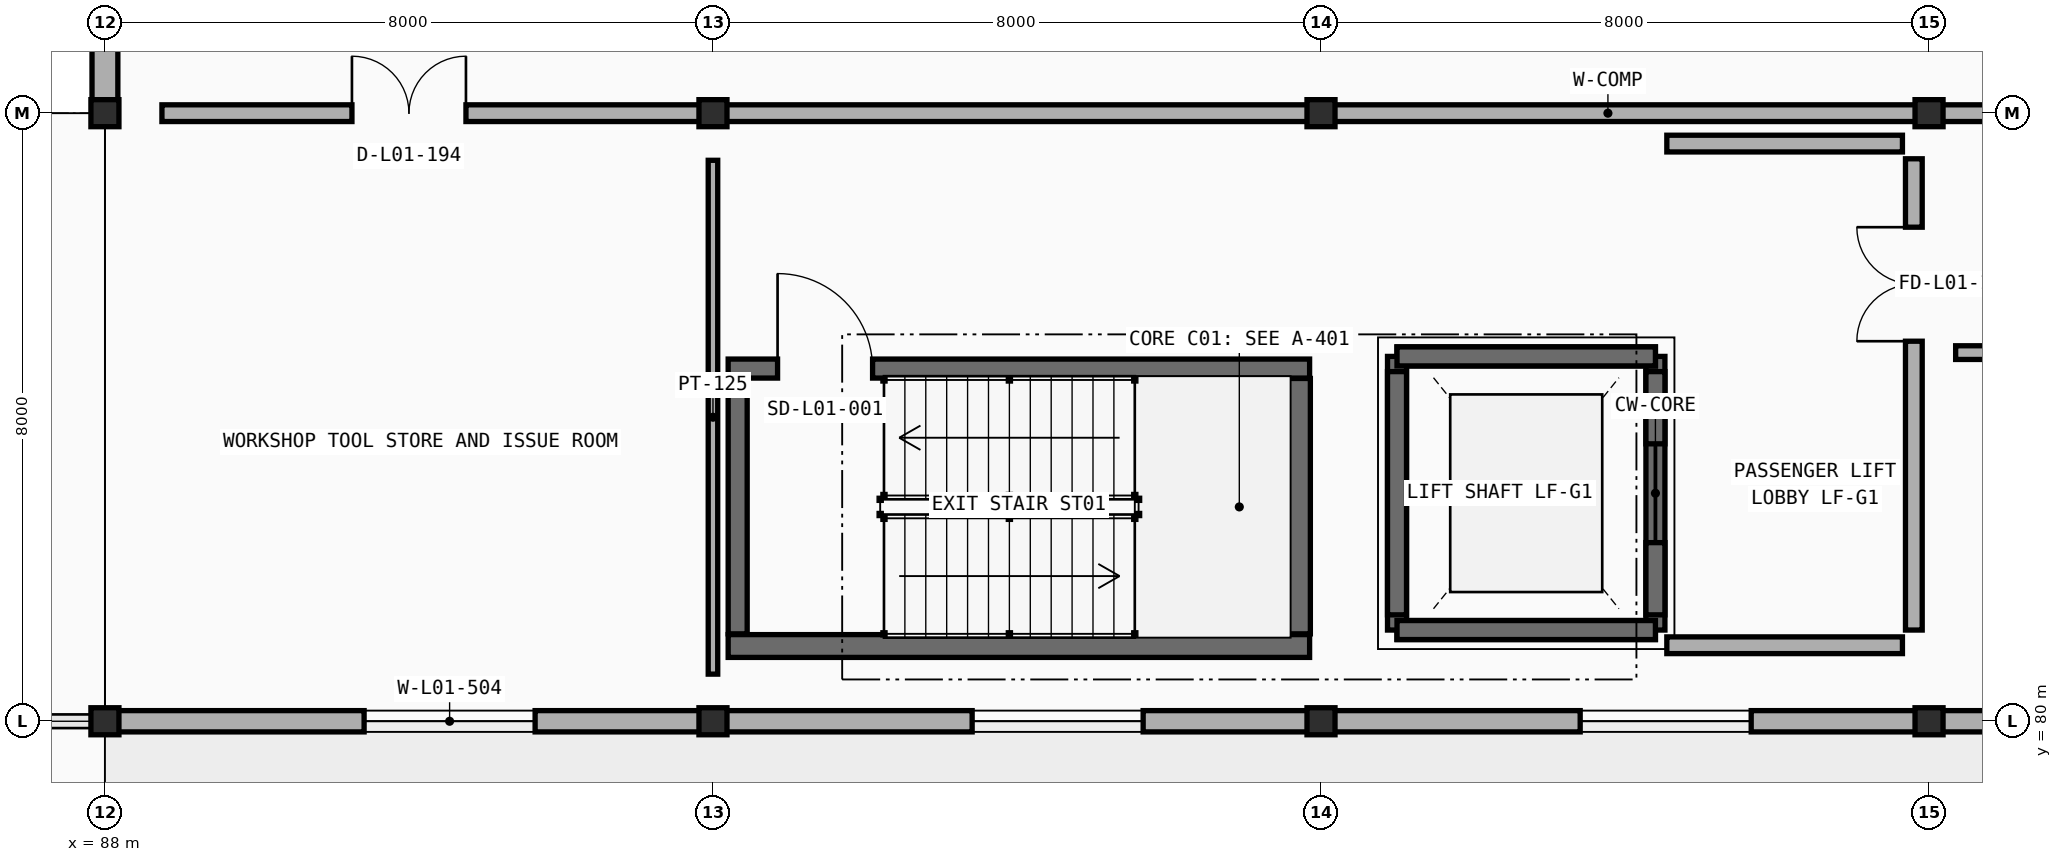
"""IFC4 building model, lengths in metres.
Left out: names, types, materials, properties, quantities, classifications, styles, units other than length and angle.
Written with IfcOpenShell. Run it as: python <this file> out.ifc"""

import sys

from ifc_helpers import new_model, si_unit, direction, frame, frame_2d, origin, origin_2d, place, context, subcontext, project, spatial, rectangle, i_section, extrude, element, fill, save


model = new_model("IFC4")
c1 = context("Model", 3, precision=1e-05, world=origin(), true_north=direction((0.0, 1.0)))
c2 = subcontext(c1, "Body", "Model", "MODEL_VIEW")
j1 = project(units=[si_unit("LENGTHUNIT", "METRE"), si_unit("PLANEANGLEUNIT", "RADIAN")], contexts=[c1])
p1 = place(None, origin())
s1 = spatial("IfcSite", under=j1, at=p1, CompositionType="ELEMENT")
p2 = place(p1, origin())
s2 = spatial("IfcBuilding", under=s1, at=p2, CompositionType="ELEMENT")
p3 = place(p2, origin())
s3 = spatial("IfcBuildingStorey", under=s2, at=p3, CompositionType="ELEMENT", Elevation=0.0)
for number, where, z_axis, x_axis in (
    (1, (88.0, 80.0, 0.0), (0.0, 0.0, 1.0), (1.0, 0.0, 0.0)),
    (2, (96.0, 80.0, 0.0), (0.0, 0.0, 1.0), (1.0, 0.0, 0.0)),
    (3, (104.0, 80.0, 0.0), (0.0, 0.0, 1.0), (1.0, 0.0, 0.0)),
    (4, (112.0, 80.0, 0.0), (0.0, 0.0, 1.0), (1.0, 0.0, 0.0)),
    (5, (88.0, 88.0, 0.0), (0.0, 0.0, 1.0), (1.0, 0.0, 0.0)),
    (6, (96.0, 88.0, 0.0), (0.0, 0.0, 1.0), (1.0, 0.0, 0.0)),
    (7, (104.0, 88.0, 0.0), (0.0, 0.0, 1.0), (1.0, 0.0, 0.0)),
    (8, (112.0, 88.0, 0.0), (0.0, 0.0, 1.0), (1.0, 0.0, 0.0)),
):
    element("IfcColumn", number, at=place(p3, frame(where, z_axis=z_axis, x_axis=x_axis)), inside=s3, PredefinedType="COLUMN", context=c2, shape_type="SweptSolid", body=[
        extrude(i_section(OverallWidth=0.369, OverallDepth=0.356, WebThickness=0.01, FlangeThickness=0.018, FilletRadius=0.015, at=origin_2d()), origin(), (0.0, 0.0, 1.0), 4.8),
    ])
p4 = place(p3, frame((88.0, 88.004, 0.0), z_axis=(0.0, 0.0, 1.0), x_axis=(0.0, 1.0, 0.0)))
e9 = element("IfcWall", 9, at=p4, inside=s3, PredefinedType="STANDARD", context=c2, shape_type="SweptSolid", body=[
    extrude(rectangle(XDim=7.992, YDim=0.34, at=frame_2d((3.996, 0.0))), origin(), (0.0, 0.0, 1.0), 4.037),
])
p5 = place(p4, frame((2.276, 0.0, 1.2)))
e10 = element("IfcOpeningElement", 10, at=p5, cuts=e9, PredefinedType="OPENING", context=c2, shape_type="SweptSolid", body=[
    extrude(rectangle(XDim=2.05, YDim=2.0, at=frame_2d((1.025, 1.0))), frame((0.0, 0.18, 0.0), z_axis=(0.0, -1.0, 0.0), x_axis=(1.0, 0.0, 0.0)), (0.0, 0.0, 1.0), 0.36),
])
p6 = place(p3, frame((95.996, 80.0, 0.0), z_axis=(0.0, 0.0, 1.0), x_axis=(-1.0, 0.0, 0.0)))
e11 = element("IfcWall", 11, at=p6, inside=s3, PredefinedType="STANDARD", context=c2, shape_type="SweptSolid", body=[
    extrude(rectangle(XDim=7.992, YDim=0.28, at=frame_2d((3.996, 0.0))), origin(), (0.0, 0.0, 1.0), 3.895),
])
p7 = place(p6, frame((2.336, 0.0, 0.95)))
e12 = element("IfcOpeningElement", 12, at=p7, cuts=e11, PredefinedType="OPENING", context=c2, shape_type="SweptSolid", body=[
    extrude(rectangle(XDim=2.25, YDim=2.0, at=frame_2d((1.125, 1.0))), frame((0.0, 0.15, 0.0), z_axis=(0.0, -1.0, 0.0), x_axis=(1.0, 0.0, 0.0)), (0.0, 0.0, 1.0), 0.3),
])
p8 = place(p3, frame((103.996, 80.0, 0.0), z_axis=(0.0, 0.0, 1.0), x_axis=(-1.0, 0.0, 0.0)))
e13 = element("IfcWall", 13, at=p8, inside=s3, PredefinedType="STANDARD", context=c2, shape_type="SweptSolid", body=[
    extrude(rectangle(XDim=7.992, YDim=0.28, at=frame_2d((3.996, 0.0))), origin(), (0.0, 0.0, 1.0), 3.895),
])
p9 = place(p8, frame((2.336, 0.0, 0.95)))
e14 = element("IfcOpeningElement", 14, at=p9, cuts=e13, PredefinedType="OPENING", context=c2, shape_type="SweptSolid", body=[
    extrude(rectangle(XDim=2.25, YDim=2.0, at=frame_2d((1.125, 1.0))), frame((0.0, 0.15, 0.0), z_axis=(0.0, -1.0, 0.0), x_axis=(1.0, 0.0, 0.0)), (0.0, 0.0, 1.0), 0.3),
])
p10 = place(p3, frame((111.996, 80.0, 0.0), z_axis=(0.0, 0.0, 1.0), x_axis=(-1.0, 0.0, 0.0)))
e15 = element("IfcWall", 15, at=p10, inside=s3, PredefinedType="STANDARD", context=c2, shape_type="SweptSolid", body=[
    extrude(rectangle(XDim=7.992, YDim=0.28, at=frame_2d((3.996, 0.0))), origin(), (0.0, 0.0, 1.0), 3.895),
])
p11 = place(p10, frame((2.336, 0.0, 0.95)))
e16 = element("IfcOpeningElement", 16, at=p11, cuts=e15, PredefinedType="OPENING", context=c2, shape_type="SweptSolid", body=[
    extrude(rectangle(XDim=2.25, YDim=2.0, at=frame_2d((1.125, 1.0))), frame((0.0, 0.15, 0.0), z_axis=(0.0, -1.0, 0.0), x_axis=(1.0, 0.0, 0.0)), (0.0, 0.0, 1.0), 0.3),
])
p12 = place(p3, frame((119.996, 80.0, 0.0), z_axis=(0.0, 0.0, 1.0), x_axis=(-1.0, 0.0, 0.0)))
e17 = element("IfcWall", 17, at=p12, inside=s3, PredefinedType="STANDARD", context=c2, shape_type="SweptSolid", body=[
    extrude(rectangle(XDim=7.992, YDim=0.28, at=frame_2d((3.996, 0.0))), origin(), (0.0, 0.0, 1.0), 3.895),
])
p13 = place(p12, frame((2.736, 0.0, 0.0)))
e18 = element("IfcOpeningElement", 18, at=p13, cuts=e17, PredefinedType="OPENING", context=c2, shape_type="SweptSolid", body=[
    extrude(rectangle(XDim=2.0, YDim=2.4, at=frame_2d((1.0, 1.2))), frame((0.0, 0.15, 0.0), z_axis=(0.0, -1.0, 0.0), x_axis=(1.0, 0.0, 0.0)), (0.0, 0.0, 1.0), 0.3),
])
p14 = place(p3, frame((96.2, 80.99, 0.0), z_axis=(0.0, 0.0, 1.0), x_axis=(1.0, 0.0, 0.0)))
e19 = element("IfcWall", 19, at=p14, inside=s3, PredefinedType="SHEAR", context=c2, shape_type="SweptSolid", body=[
    extrude(rectangle(XDim=7.65, YDim=0.3, at=frame_2d((3.825, 0.0))), origin(), (0.0, 0.0, 1.0), 4.8),
])
p15 = place(p3, frame((103.71, 81.15, 0.0), z_axis=(0.0, 0.0, 1.0), x_axis=(0.0, 1.0, 0.0)))
e20 = element("IfcWall", 20, at=p15, inside=s3, PredefinedType="SHEAR", context=c2, shape_type="SweptSolid", body=[
    extrude(rectangle(XDim=3.36, YDim=0.3, at=frame_2d((1.68, 0.0))), origin(), (0.0, 0.0, 1.0), 4.8),
])
p16 = place(p3, frame((96.2, 84.64, 0.0), z_axis=(0.0, 0.0, 1.0), x_axis=(1.0, 0.0, 0.0)))
e21 = element("IfcWall", 21, at=p16, inside=s3, PredefinedType="SOLIDWALL", context=c2, shape_type="SweptSolid", body=[
    extrude(rectangle(XDim=7.65, YDim=0.25, at=frame_2d((3.825, 0.0))), origin(), (0.0, 0.0, 1.0), 4.8),
])
p17 = place(p16, frame((0.65, 0.0, 0.0)))
e22 = element("IfcOpeningElement", 22, at=p17, cuts=e21, PredefinedType="OPENING", context=c2, shape_type="SweptSolid", body=[
    extrude(rectangle(XDim=1.25, YDim=2.15, at=frame_2d((0.625, 1.075))), frame((0.0, 0.135, 0.0), z_axis=(0.0, -1.0, 0.0), x_axis=(1.0, 0.0, 0.0)), (0.0, 0.0, 1.0), 0.27),
])
p18 = place(p3, frame((96.325, 81.15, 0.0), z_axis=(0.0, 0.0, 1.0), x_axis=(0.0, 1.0, 0.0)))
e23 = element("IfcWall", 23, at=p18, inside=s3, PredefinedType="SOLIDWALL", context=c2, shape_type="SweptSolid", body=[
    extrude(rectangle(XDim=3.36, YDim=0.25, at=frame_2d((1.68, 0.0))), origin(), (0.0, 0.0, 1.0), 4.8),
])
p19 = place(p3, frame((105.0, 81.2, -1.5), z_axis=(0.0, 0.0, 1.0), x_axis=(1.0, 0.0, 0.0)))
e24 = element("IfcWall", 24, at=p19, inside=s3, PredefinedType="SOLIDWALL", context=c2, shape_type="SweptSolid", body=[
    extrude(rectangle(XDim=3.4, YDim=0.25, at=frame_2d((1.7, 0.0))), origin(), (0.0, 0.0, 1.0), 1.5),
])
p20 = place(p3, frame((108.4, 81.2, -1.5), z_axis=(0.0, 0.0, 1.0), x_axis=(0.0, 1.0, 0.0)))
e25 = element("IfcWall", 25, at=p20, inside=s3, PredefinedType="SOLIDWALL", context=c2, shape_type="SweptSolid", body=[
    extrude(rectangle(XDim=3.6, YDim=0.25, at=frame_2d((1.8, 0.0))), origin(), (0.0, 0.0, 1.0), 1.5),
])
p21 = place(p3, frame((108.4, 84.8, -1.5), z_axis=(0.0, 0.0, 1.0), x_axis=(-1.0, 0.0, 0.0)))
e26 = element("IfcWall", 26, at=p21, inside=s3, PredefinedType="SOLIDWALL", context=c2, shape_type="SweptSolid", body=[
    extrude(rectangle(XDim=3.4, YDim=0.25, at=frame_2d((1.7, 0.0))), origin(), (0.0, 0.0, 1.0), 1.5),
])
p22 = place(p3, frame((105.0, 84.8, -1.5), z_axis=(0.0, 0.0, 1.0), x_axis=(0.0, -1.0, 0.0)))
e27 = element("IfcWall", 27, at=p22, inside=s3, PredefinedType="SOLIDWALL", context=c2, shape_type="SweptSolid", body=[
    extrude(rectangle(XDim=3.6, YDim=0.25, at=frame_2d((1.8, 0.0))), origin(), (0.0, 0.0, 1.0), 1.5),
])
for number, where, z_axis, x_axis in (
    (28, (105.0, 81.2, 0.0), (0.0, 0.0, 1.0), (1.0, 0.0, 0.0)),
    (29, (105.0, 84.8, 0.0), (0.0, 0.0, 1.0), (1.0, 0.0, 0.0)),
):
    element("IfcWall", number, at=place(p3, frame(where, z_axis=z_axis, x_axis=x_axis)), inside=s3, PredefinedType="SOLIDWALL", context=c2, shape_type="SweptSolid", body=[
        extrude(rectangle(XDim=3.4, YDim=0.25, at=frame_2d((1.7, 0.0))), origin(), (0.0, 0.0, 1.0), 4.8),
    ])
p23 = place(p3, frame((105.0, 81.4, 0.0), z_axis=(0.0, 0.0, 1.0), x_axis=(0.0, 1.0, 0.0)))
e30 = element("IfcWall", 30, at=p23, inside=s3, PredefinedType="SOLIDWALL", context=c2, shape_type="SweptSolid", body=[
    extrude(rectangle(XDim=3.2, YDim=0.25, at=frame_2d((1.6, 0.0))), origin(), (0.0, 0.0, 1.0), 4.8),
])
p24 = place(p3, frame((108.4, 81.4, 0.0), z_axis=(0.0, 0.0, 1.0), x_axis=(0.0, 1.0, 0.0)))
e31 = element("IfcWall", 31, at=p24, inside=s3, PredefinedType="SOLIDWALL", context=c2, shape_type="SweptSolid", body=[
    extrude(rectangle(XDim=3.2, YDim=0.25, at=frame_2d((1.6, 0.0))), origin(), (0.0, 0.0, 1.0), 4.8),
])
p25 = place(p24, frame((0.95, 0.0, 0.0)))
e32 = element("IfcOpeningElement", 32, at=p25, cuts=e31, PredefinedType="OPENING", context=c2, shape_type="SweptSolid", body=[
    extrude(rectangle(XDim=1.3, YDim=2.2, at=frame_2d((0.65, 1.1))), frame((0.0, 0.135, 0.0), z_axis=(0.0, -1.0, 0.0), x_axis=(1.0, 0.0, 0.0)), (0.0, 0.0, 1.0), 0.27),
])
p26 = place(p3, frame((108.55, 81.0, 0.0), z_axis=(0.0, 0.0, 1.0), x_axis=(1.0, 0.0, 0.0)))
e33 = element("IfcWall", 33, at=p26, inside=s3, PredefinedType="PARTITIONING", context=c2, shape_type="SweptSolid", body=[
    extrude(rectangle(XDim=3.1, YDim=0.22, at=frame_2d((1.55, 0.0))), origin(), (0.0, 0.0, 1.0), 3.9),
])
p27 = place(p3, frame((108.55, 87.6, 0.0), z_axis=(0.0, 0.0, 1.0), x_axis=(1.0, 0.0, 0.0)))
e34 = element("IfcWall", 34, at=p27, inside=s3, PredefinedType="PARTITIONING", context=c2, shape_type="SweptSolid", body=[
    extrude(rectangle(XDim=3.1, YDim=0.22, at=frame_2d((1.55, 0.0))), origin(), (0.0, 0.0, 1.0), 3.795),
])
p28 = place(p3, frame((111.8, 81.2, 0.0), z_axis=(0.0, 0.0, 1.0), x_axis=(0.0, 1.0, 0.0)))
e35 = element("IfcWall", 35, at=p28, inside=s3, PredefinedType="PARTITIONING", context=c2, shape_type="SweptSolid", body=[
    extrude(rectangle(XDim=6.2, YDim=0.22, at=frame_2d((3.1, 0.0))), origin(), (0.0, 0.0, 1.0), 3.745),
])
p29 = place(p28, frame((3.8, 0.0, 0.0)))
e36 = element("IfcOpeningElement", 36, at=p29, cuts=e35, PredefinedType="OPENING", context=c2, shape_type="SweptSolid", body=[
    extrude(rectangle(XDim=1.5, YDim=2.2, at=frame_2d((0.75, 1.1))), frame((0.0, 0.12, 0.0), z_axis=(0.0, -1.0, 0.0), x_axis=(1.0, 0.0, 0.0)), (0.0, 0.0, 1.0), 0.24),
])
p30 = place(p3, frame((88.75, 88.0, 0.0), z_axis=(0.0, 0.0, 1.0), x_axis=(1.0, 0.0, 0.0)))
e37 = element("IfcWall", 37, at=p30, inside=s3, PredefinedType="PARTITIONING", context=c2, shape_type="SweptSolid", body=[
    extrude(rectangle(XDim=38.8, YDim=0.22, at=frame_2d((19.4, 0.0))), origin(), (0.0, 0.0, 1.0), 3.795),
])
p31 = place(p30, frame((2.5, 0.0, 0.0)))
e38 = element("IfcOpeningElement", 38, at=p31, cuts=e37, PredefinedType="OPENING", context=c2, shape_type="SweptSolid", body=[
    extrude(rectangle(XDim=1.5, YDim=2.2, at=frame_2d((0.75, 1.1))), frame((0.0, 0.12, 0.0), z_axis=(0.0, -1.0, 0.0), x_axis=(1.0, 0.0, 0.0)), (0.0, 0.0, 1.0), 0.24),
])
p32 = place(p30, frame((34.05, 0.0, 0.0)))
e39 = element("IfcOpeningElement", 39, at=p32, cuts=e37, PredefinedType="OPENING", context=c2, shape_type="SweptSolid", body=[
    extrude(rectangle(XDim=1.5, YDim=2.2, at=frame_2d((0.75, 1.1))), frame((0.0, 0.12, 0.0), z_axis=(0.0, -1.0, 0.0), x_axis=(1.0, 0.0, 0.0)), (0.0, 0.0, 1.0), 0.24),
])
p33 = place(p3, frame((96.0, 80.62, 0.0), z_axis=(0.0, 0.0, 1.0), x_axis=(0.0, 1.0, 0.0)))
e40 = element("IfcWall", 40, at=p33, inside=s3, PredefinedType="PARTITIONING", context=c2, shape_type="SweptSolid", body=[
    extrude(rectangle(XDim=6.76, YDim=0.125, at=frame_2d((3.38, 0.0))), origin(), (0.0, 0.0, 1.0), 3.745),
])
p34 = place(p3, frame((112.35, 84.85, 0.0), z_axis=(0.0, 0.0, 1.0), x_axis=(1.0, 0.0, 0.0)))
e41 = element("IfcWall", 41, at=p34, inside=s3, PredefinedType="PARTITIONING", context=c2, shape_type="SweptSolid", body=[
    extrude(rectangle(XDim=31.3, YDim=0.18, at=frame_2d((15.65, 0.0))), origin(), (0.0, 0.0, 1.0), 3.9),
])
p35 = place(p34, frame((2.93, 0.0, 0.0)))
e42 = element("IfcOpeningElement", 42, at=p35, cuts=e41, PredefinedType="OPENING", context=c2, shape_type="SweptSolid", body=[
    extrude(rectangle(XDim=1.44, YDim=2.2, at=frame_2d((0.72, 1.1))), frame((0.0, 0.1, 0.0), z_axis=(0.0, -1.0, 0.0), x_axis=(1.0, 0.0, 0.0)), (0.0, 0.0, 1.0), 0.2),
])
p36 = place(p7, origin())
e43 = element("IfcWindow", 43, at=p36, inside=s3, PartitioningType="DOUBLE_PANEL_VERTICAL", PredefinedType="WINDOW", context=c2, shape_type="SweptSolid", body=[
    extrude(rectangle(XDim=2.25, YDim=2.0, at=frame_2d((1.125, 1.0))), frame((0.0, 0.03, 0.0), z_axis=(0.0, -1.0, 0.0), x_axis=(1.0, 0.0, 0.0)), (0.0, 0.0, 1.0), 0.06),
])
fill(e12, e43)
p37 = place(p9, origin())
e44 = element("IfcWindow", 44, at=p37, inside=s3, PartitioningType="DOUBLE_PANEL_VERTICAL", PredefinedType="WINDOW", context=c2, shape_type="SweptSolid", body=[
    extrude(rectangle(XDim=2.25, YDim=2.0, at=frame_2d((1.125, 1.0))), frame((0.0, 0.03, 0.0), z_axis=(0.0, -1.0, 0.0), x_axis=(1.0, 0.0, 0.0)), (0.0, 0.0, 1.0), 0.06),
])
fill(e14, e44)
p38 = place(p11, origin())
e45 = element("IfcWindow", 45, at=p38, inside=s3, PartitioningType="DOUBLE_PANEL_VERTICAL", PredefinedType="WINDOW", context=c2, shape_type="SweptSolid", body=[
    extrude(rectangle(XDim=2.25, YDim=2.0, at=frame_2d((1.125, 1.0))), frame((0.0, 0.03, 0.0), z_axis=(0.0, -1.0, 0.0), x_axis=(1.0, 0.0, 0.0)), (0.0, 0.0, 1.0), 0.06),
])
fill(e16, e45)
p39 = place(p17, origin())
e46 = element("IfcDoor", 46, at=p39, inside=s3, OperationType="SINGLE_SWING_LEFT", PredefinedType="DOOR", context=c2, shape_type="SweptSolid", body=[
    extrude(rectangle(XDim=1.25, YDim=2.15, at=frame_2d((0.625, 1.075))), frame((0.0, 0.025, 0.0), z_axis=(0.0, -1.0, 0.0), x_axis=(1.0, 0.0, 0.0)), (0.0, 0.0, 1.0), 0.05),
])
fill(e22, e46)
p40 = place(p25, origin())
e47 = element("IfcDoor", 47, at=p40, inside=s3, OperationType="DOUBLE_DOOR_SLIDING", PredefinedType="DOOR", context=c2, shape_type="SweptSolid", body=[
    extrude(rectangle(XDim=1.3, YDim=2.2, at=frame_2d((0.65, 1.1))), frame((0.0, 0.025, 0.0), z_axis=(0.0, -1.0, 0.0), x_axis=(1.0, 0.0, 0.0)), (0.0, 0.0, 1.0), 0.05),
])
fill(e32, e47)
p41 = place(p29, origin())
e48 = element("IfcDoor", 48, at=p41, inside=s3, OperationType="DOUBLE_DOOR_SINGLE_SWING", PredefinedType="DOOR", context=c2, shape_type="SweptSolid", body=[
    extrude(rectangle(XDim=1.5, YDim=2.2, at=frame_2d((0.75, 1.1))), frame((0.0, 0.025, 0.0), z_axis=(0.0, -1.0, 0.0), x_axis=(1.0, 0.0, 0.0)), (0.0, 0.0, 1.0), 0.05),
])
fill(e36, e48)
p42 = place(p31, origin())
e49 = element("IfcDoor", 49, at=p42, inside=s3, OperationType="DOUBLE_DOOR_SINGLE_SWING", PredefinedType="DOOR", context=c2, shape_type="SweptSolid", body=[
    extrude(rectangle(XDim=1.5, YDim=2.2, at=frame_2d((0.75, 1.1))), frame((0.0, 0.025, 0.0), z_axis=(0.0, -1.0, 0.0), x_axis=(1.0, 0.0, 0.0)), (0.0, 0.0, 1.0), 0.05),
])
fill(e38, e49)
save(model, sys.argv[1])
